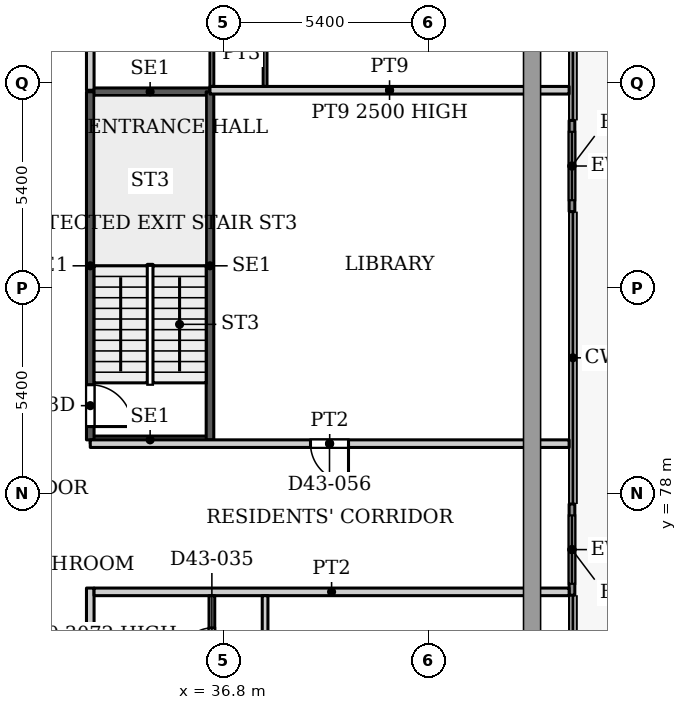
"""IFC4 building model, lengths in metres.
Left out: names, types, materials, properties, quantities, classifications, styles, units other than length and angle.
Written with IfcOpenShell. Run it as: python <this file> out.ifc"""

import sys

from ifc_helpers import new_model, si_unit, direction, frame, frame_2d, origin, place, context, subcontext, project, spatial, rectangle, extrude, source, transform, mapped, element, fill, save


model = new_model("IFC4")
c1 = context("Model", 3, precision=1e-05, world=origin(), true_north=direction((0.0, 1.0)))
c2 = subcontext(c1, "Body", "Model", "MODEL_VIEW")
j1 = project(units=[si_unit("LENGTHUNIT", "METRE"), si_unit("PLANEANGLEUNIT", "RADIAN")], contexts=[c1])
p1 = place(None, origin())
s1 = spatial("IfcSite", under=j1, at=p1, CompositionType="ELEMENT")
p2 = place(p1, origin())
s2 = spatial("IfcBuilding", under=s1, at=p2, CompositionType="ELEMENT")
p3 = place(p2, frame((0.0, 0.0, 187.7)))
s3 = spatial("IfcBuildingStorey", under=s2, at=p3, CompositionType="ELEMENT", Elevation=187.7)
p4 = place(p3, frame((45.975, 87.806, 0.0), z_axis=(0.0, 0.0, 1.0), x_axis=(0.0, -1.0, 0.0)))
e1 = element("IfcWall", 1, at=p4, inside=s3, PredefinedType="SOLIDWALL", context=c2, shape_type="SweptSolid", body=[
    extrude(rectangle(XDim=2.4, YDim=0.15, at=frame_2d((1.2, 0.0))), origin(), (0.0, 0.0, 1.0), 3.75),
])
p5 = place(p4, frame((0.3, 0.0, 0.0)))
e2 = element("IfcOpeningElement", 2, at=p5, cuts=e1, PredefinedType="OPENING", context=c2, shape_type="SweptSolid", body=[
    extrude(rectangle(XDim=1.8, YDim=2.4, at=frame_2d((0.9, 1.2))), frame((0.0, 0.085, 0.0), z_axis=(0.0, -1.0, 0.0), x_axis=(1.0, 0.0, 0.0)), (0.0, 0.0, 1.0), 0.17),
])
p6 = place(p3, frame((45.975, 77.712, 0.0), z_axis=(0.0, 0.0, 1.0), x_axis=(0.0, -1.0, 0.0)))
e3 = element("IfcWall", 3, at=p6, inside=s3, PredefinedType="SOLIDWALL", context=c2, shape_type="SweptSolid", body=[
    extrude(rectangle(XDim=2.4, YDim=0.15, at=frame_2d((1.2, 0.0))), origin(), (0.0, 0.0, 1.0), 3.75),
])
p7 = place(p6, frame((0.3, 0.0, 0.0)))
e4 = element("IfcOpeningElement", 4, at=p7, cuts=e3, PredefinedType="OPENING", context=c2, shape_type="SweptSolid", body=[
    extrude(rectangle(XDim=1.8, YDim=2.4, at=frame_2d((0.9, 1.2))), frame((0.0, 0.085, 0.0), z_axis=(0.0, -1.0, 0.0), x_axis=(1.0, 0.0, 0.0)), (0.0, 0.0, 1.0), 0.17),
])
for number, where, z_axis, x_axis in (
    (5, (33.3, 79.4, 0.0), (0.0, 0.0, 1.0), (1.0, 0.0, 0.0)),
    (6, (33.3, 88.56, 0.0), (0.0, 0.0, 1.0), (1.0, 0.0, 0.0)),
):
    element("IfcWall", number, at=place(p3, frame(where, z_axis=z_axis, x_axis=x_axis)), inside=s3, PredefinedType="SHEAR", context=c2, shape_type="SweptSolid", body=[
        extrude(rectangle(XDim=3.15, YDim=0.2, at=frame_2d((1.575, 0.0))), origin(), (0.0, 0.0, 1.0), 3.9),
    ])
p8 = place(p3, frame((33.3, 79.4, 0.0), z_axis=(0.0, 0.0, 1.0), x_axis=(0.0, 1.0, 0.0)))
e7 = element("IfcWall", 7, at=p8, inside=s3, PredefinedType="SHEAR", context=c2, shape_type="SweptSolid", body=[
    extrude(rectangle(XDim=9.16, YDim=0.2, at=frame_2d((4.58, 0.0))), origin(), (0.0, 0.0, 1.0), 3.9),
])
p9 = place(p8, frame((0.35, 0.0, 0.0)))
e8 = element("IfcOpeningElement", 8, at=p9, cuts=e7, PredefinedType="OPENING", context=c2, shape_type="SweptSolid", body=[
    extrude(rectangle(XDim=1.1, YDim=2.2, at=frame_2d((0.55, 1.1))), frame((0.0, 0.11, 0.0), z_axis=(0.0, -1.0, 0.0), x_axis=(1.0, 0.0, 0.0)), (0.0, 0.0, 1.0), 0.22),
])
p10 = place(p3, frame((36.45, 79.4, 0.0), z_axis=(0.0, 0.0, 1.0), x_axis=(0.0, 1.0, 0.0)))
e9 = element("IfcWall", 9, at=p10, inside=s3, PredefinedType="SHEAR", context=c2, shape_type="SweptSolid", body=[
    extrude(rectangle(XDim=9.16, YDim=0.2, at=frame_2d((4.58, 0.0))), origin(), (0.0, 0.0, 1.0), 3.9),
])
p11 = place(p3, frame((33.3, 57.9, 0.0), z_axis=(0.0, 0.0, 1.0), x_axis=(0.0, 1.0, 0.0)))
e10 = element("IfcWall", 10, at=p11, inside=s3, PredefinedType="PARTITIONING", context=c2, shape_type="SweptSolid", body=[
    extrude(rectangle(XDim=17.6, YDim=0.2, at=frame_2d((8.8, 0.0))), origin(), (0.0, 0.0, 1.0), 3.6),
])
p12 = place(p11, frame((8.9, 0.0, 0.0)))
e11 = element("IfcOpeningElement", 11, at=p12, cuts=e10, PredefinedType="OPENING", context=c2, shape_type="SweptSolid", body=[
    extrude(rectangle(XDim=1.0, YDim=2.1, at=frame_2d((0.5, 1.05))), frame((0.0, 0.11, 0.0), z_axis=(0.0, -1.0, 0.0), x_axis=(1.0, 0.0, 0.0)), (0.0, 0.0, 1.0), 0.22),
])
p13 = place(p3, frame((33.3, 79.3, 0.0), z_axis=(0.0, 0.0, 1.0), x_axis=(1.0, 0.0, 0.0)))
e12 = element("IfcWall", 12, at=p13, inside=s3, PredefinedType="PARTITIONING", context=c2, shape_type="SweptSolid", body=[
    extrude(rectangle(XDim=12.6, YDim=0.2, at=frame_2d((6.3, 0.0))), origin(), (0.0, 0.0, 1.0), 3.6),
])
p14 = place(p13, frame((5.795, 0.0, 0.0)))
e13 = element("IfcOpeningElement", 13, at=p14, cuts=e12, PredefinedType="OPENING", context=c2, shape_type="SweptSolid", body=[
    extrude(rectangle(XDim=1.0, YDim=2.1, at=frame_2d((0.5, 1.05))), frame((0.0, 0.11, 0.0), z_axis=(0.0, -1.0, 0.0), x_axis=(1.0, 0.0, 0.0)), (0.0, 0.0, 1.0), 0.22),
])
p15 = place(p3, frame((33.3, 88.6, 0.0), z_axis=(0.0, 0.0, 1.0), x_axis=(0.0, 1.0, 0.0)))
e14 = element("IfcWall", 14, at=p15, inside=s3, PredefinedType="PARTITIONING", context=c2, shape_type="SweptSolid", body=[
    extrude(rectangle(XDim=5.175, YDim=0.2, at=frame_2d((2.587, 0.0))), origin(), (0.0, 0.0, 1.0), 3.6),
])
p16 = place(p15, frame((3.7, 0.0, 0.0)))
e15 = element("IfcOpeningElement", 15, at=p16, cuts=e14, PredefinedType="OPENING", context=c2, shape_type="SweptSolid", body=[
    extrude(rectangle(XDim=1.0, YDim=2.1, at=frame_2d((0.5, 1.05))), frame((0.0, 0.11, 0.0), z_axis=(0.0, -1.0, 0.0), x_axis=(1.0, 0.0, 0.0)), (0.0, 0.0, 1.0), 0.22),
])
p17 = place(p3, frame((33.4, 75.4, 0.0), z_axis=(0.0, 0.0, 1.0), x_axis=(1.0, 0.0, 0.0)))
e16 = element("IfcWall", 16, at=p17, inside=s3, PredefinedType="PARTITIONING", context=c2, shape_type="SweptSolid", body=[
    extrude(rectangle(XDim=12.5, YDim=0.2, at=frame_2d((6.25, 0.0))), origin(), (0.0, 0.0, 1.0), 3.6),
])
p18 = place(p3, frame((36.45, 88.6, 0.0), z_axis=(0.0, 0.0, 1.0), x_axis=(1.0, 0.0, 0.0)))
e17 = element("IfcWall", 17, at=p18, inside=s3, PredefinedType="PARTITIONING", context=c2, shape_type="SweptSolid", body=[
    extrude(rectangle(XDim=9.45, YDim=0.2, at=frame_2d((4.725, 0.0))), origin(), (0.0, 0.0, 1.0), 2.5),
])
p19 = place(p3, frame((36.5, 68.75, 0.0), z_axis=(0.0, 0.0, 1.0), x_axis=(0.0, 1.0, 0.0)))
e18 = element("IfcWall", 18, at=p19, inside=s3, PredefinedType="PARTITIONING", context=c2, shape_type="SweptSolid", body=[
    extrude(rectangle(XDim=6.55, YDim=0.15, at=frame_2d((3.275, 0.0))), origin(), (0.0, 0.0, 1.0), 3.6),
])
p20 = place(p19, frame((4.9, 0.0, 0.0)))
e19 = element("IfcOpeningElement", 19, at=p20, cuts=e18, PredefinedType="OPENING", context=c2, shape_type="SweptSolid", body=[
    extrude(rectangle(XDim=0.8, YDim=2.1, at=frame_2d((0.4, 1.05))), frame((0.0, 0.085, 0.0), z_axis=(0.0, -1.0, 0.0), x_axis=(1.0, 0.0, 0.0)), (0.0, 0.0, 1.0), 0.17),
])
p21 = place(p19, frame((1.55, 0.0, 0.0)))
e20 = element("IfcOpeningElement", 20, at=p21, cuts=e18, PredefinedType="OPENING", context=c2, shape_type="SweptSolid", body=[
    extrude(rectangle(XDim=0.9, YDim=2.1, at=frame_2d((0.45, 1.05))), frame((0.0, 0.085, 0.0), z_axis=(0.0, -1.0, 0.0), x_axis=(1.0, 0.0, 0.0)), (0.0, 0.0, 1.0), 0.17),
])
p22 = place(p3, frame((36.5, 88.7, 0.0), z_axis=(0.0, 0.0, 1.0), x_axis=(0.0, 1.0, 0.0)))
e21 = element("IfcWall", 21, at=p22, inside=s3, PredefinedType="PARTITIONING", context=c2, shape_type="SweptSolid", body=[
    extrude(rectangle(XDim=3.25, YDim=0.1, at=frame_2d((1.625, 0.0))), origin(), (0.0, 0.0, 1.0), 3.6),
])
p23 = place(p22, frame((1.1, 0.0, 0.0)))
e22 = element("IfcOpeningElement", 22, at=p23, cuts=e21, PredefinedType="OPENING", context=c2, shape_type="SweptSolid", body=[
    extrude(rectangle(XDim=0.9, YDim=2.1, at=frame_2d((0.45, 1.05))), frame((0.0, 0.06, 0.0), z_axis=(0.0, -1.0, 0.0), x_axis=(1.0, 0.0, 0.0)), (0.0, 0.0, 1.0), 0.12),
])
p24 = place(p3, frame((37.9, 58.1, 0.0), z_axis=(0.0, 0.0, 1.0), x_axis=(0.0, 1.0, 0.0)))
e23 = element("IfcWall", 23, at=p24, inside=s3, PredefinedType="PARTITIONING", context=c2, shape_type="SweptSolid", body=[
    extrude(rectangle(XDim=17.2, YDim=0.15, at=frame_2d((8.6, 0.0))), origin(), (0.0, 0.0, 1.0), 3.6),
])
p25 = place(p24, frame((0.95, 0.0, 0.0)))
e24 = element("IfcOpeningElement", 24, at=p25, cuts=e23, PredefinedType="OPENING", context=c2, shape_type="SweptSolid", body=[
    extrude(rectangle(XDim=0.9, YDim=2.1, at=frame_2d((0.45, 1.05))), frame((0.0, 0.085, 0.0), z_axis=(0.0, -1.0, 0.0), x_axis=(1.0, 0.0, 0.0)), (0.0, 0.0, 1.0), 0.17),
])
p26 = place(p24, frame((15.2, 0.0, 0.0)))
e25 = element("IfcOpeningElement", 25, at=p26, cuts=e23, PredefinedType="OPENING", context=c2, shape_type="SweptSolid", body=[
    extrude(rectangle(XDim=0.9, YDim=2.1, at=frame_2d((0.45, 1.05))), frame((0.0, 0.085, 0.0), z_axis=(0.0, -1.0, 0.0), x_axis=(1.0, 0.0, 0.0)), (0.0, 0.0, 1.0), 0.17),
])
p27 = place(p24, frame((9.0, 0.0, 0.0)))
e26 = element("IfcOpeningElement", 26, at=p27, cuts=e23, PredefinedType="OPENING", context=c2, shape_type="SweptSolid", body=[
    extrude(rectangle(XDim=1.0, YDim=2.1, at=frame_2d((0.5, 1.05))), frame((0.0, 0.085, 0.0), z_axis=(0.0, -1.0, 0.0), x_axis=(1.0, 0.0, 0.0)), (0.0, 0.0, 1.0), 0.17),
])
p28 = place(p24, frame((12.2, 0.0, 0.0)))
e27 = element("IfcOpeningElement", 27, at=p28, cuts=e23, PredefinedType="OPENING", context=c2, shape_type="SweptSolid", body=[
    extrude(rectangle(XDim=0.9, YDim=2.1, at=frame_2d((0.45, 1.05))), frame((0.0, 0.085, 0.0), z_axis=(0.0, -1.0, 0.0), x_axis=(1.0, 0.0, 0.0)), (0.0, 0.0, 1.0), 0.17),
])
p29 = place(p24, frame((3.8, 0.0, 0.0)))
e28 = element("IfcOpeningElement", 28, at=p29, cuts=e23, PredefinedType="OPENING", context=c2, shape_type="SweptSolid", body=[
    extrude(rectangle(XDim=0.9, YDim=2.1, at=frame_2d((0.45, 1.05))), frame((0.0, 0.085, 0.0), z_axis=(0.0, -1.0, 0.0), x_axis=(1.0, 0.0, 0.0)), (0.0, 0.0, 1.0), 0.17),
])
p30 = place(p3, frame((37.9, 88.7, 0.0), z_axis=(0.0, 0.0, 1.0), x_axis=(0.0, 1.0, 0.0)))
e29 = element("IfcWall", 29, at=p30, inside=s3, PredefinedType="PARTITIONING", context=c2, shape_type="SweptSolid", body=[
    extrude(rectangle(XDim=9.2, YDim=0.1, at=frame_2d((4.6, 0.0))), origin(), (0.0, 0.0, 1.0), 3.6),
])
p31 = place(p30, frame((1.4, 0.0, 0.0)))
e30 = element("IfcOpeningElement", 30, at=p31, cuts=e29, PredefinedType="OPENING", context=c2, shape_type="SweptSolid", body=[
    extrude(rectangle(XDim=0.9, YDim=2.1, at=frame_2d((0.45, 1.05))), frame((0.0, 0.06, 0.0), z_axis=(0.0, -1.0, 0.0), x_axis=(1.0, 0.0, 0.0)), (0.0, 0.0, 1.0), 0.12),
])
p32 = place(p30, frame((6.0, 0.0, 0.0)))
e31 = element("IfcOpeningElement", 31, at=p32, cuts=e29, PredefinedType="OPENING", context=c2, shape_type="SweptSolid", body=[
    extrude(rectangle(XDim=1.0, YDim=2.1, at=frame_2d((0.5, 1.05))), frame((0.0, 0.06, 0.0), z_axis=(0.0, -1.0, 0.0), x_axis=(1.0, 0.0, 0.0)), (0.0, 0.0, 1.0), 0.12),
])
m1 = source(origin(), c2, "Body", "SweptSolid", [
    extrude(rectangle(XDim=1.8, YDim=2.4, at=frame_2d((0.9, 1.2))), frame((0.0, 0.025, 0.0), z_axis=(0.0, -1.0, 0.0), x_axis=(1.0, 0.0, 0.0)), (0.0, 0.0, 1.0), 0.05),
])
p33 = place(p5, origin())
e32 = element("IfcDoor", 32, at=p33, inside=s3, OperationType="SLIDING_TO_LEFT", PredefinedType="DOOR", context=c2, shape_type="MappedRepresentation", body=[
    mapped(m1, transform((0.0, 0.0, 0.0), x_axis=(1.0, 0.0, 0.0), y_axis=(0.0, 1.0, 0.0), z_axis=(0.0, 0.0, 1.0), scale=1.0)),
])
fill(e2, e32)
p34 = place(p7, origin())
e33 = element("IfcDoor", 33, at=p34, inside=s3, OperationType="SLIDING_TO_LEFT", PredefinedType="DOOR", context=c2, shape_type="MappedRepresentation", body=[
    mapped(m1, transform((0.0, 0.0, 0.0), x_axis=(1.0, 0.0, 0.0), y_axis=(0.0, 1.0, 0.0), z_axis=(0.0, 0.0, 1.0), scale=1.0)),
])
fill(e4, e33)
m2 = source(origin(), c2, "Body", "SweptSolid", [
    extrude(rectangle(XDim=1.1, YDim=2.2, at=frame_2d((0.55, 1.1))), frame((0.0, 0.025, 0.0), z_axis=(0.0, -1.0, 0.0), x_axis=(1.0, 0.0, 0.0)), (0.0, 0.0, 1.0), 0.05),
])
p35 = place(p9, origin())
e34 = element("IfcDoor", 34, at=p35, inside=s3, OperationType="SINGLE_SWING_RIGHT", PredefinedType="DOOR", context=c2, shape_type="MappedRepresentation", body=[
    mapped(m2, transform((0.0, 0.0, 0.0), x_axis=(1.0, 0.0, 0.0), y_axis=(0.0, 1.0, 0.0), z_axis=(0.0, 0.0, 1.0), scale=1.0)),
])
fill(e8, e34)
m3 = source(origin(), c2, "Body", "SweptSolid", [
    extrude(rectangle(XDim=0.8, YDim=2.1, at=frame_2d((0.4, 1.05))), frame((0.0, 0.025, 0.0), z_axis=(0.0, -1.0, 0.0), x_axis=(1.0, 0.0, 0.0)), (0.0, 0.0, 1.0), 0.05),
])
p36 = place(p20, origin())
e35 = element("IfcDoor", 35, at=p36, inside=s3, OperationType="SINGLE_SWING_LEFT", PredefinedType="DOOR", context=c2, shape_type="MappedRepresentation", body=[
    mapped(m3, transform((0.0, 0.0, 0.0), x_axis=(1.0, 0.0, 0.0), y_axis=(0.0, 1.0, 0.0), z_axis=(0.0, 0.0, 1.0), scale=1.0)),
])
fill(e19, e35)
m4 = source(origin(), c2, "Body", "SweptSolid", [
    extrude(rectangle(XDim=1.0, YDim=2.1, at=frame_2d((0.5, 1.05))), frame((0.0, 0.025, 0.0), z_axis=(0.0, -1.0, 0.0), x_axis=(1.0, 0.0, 0.0)), (0.0, 0.0, 1.0), 0.05),
])
p37 = place(p14, origin())
e36 = element("IfcDoor", 36, at=p37, inside=s3, OperationType="SINGLE_SWING_RIGHT", PredefinedType="DOOR", context=c2, shape_type="MappedRepresentation", body=[
    mapped(m4, transform((0.0, 0.0, 0.0), x_axis=(1.0, 0.0, 0.0), y_axis=(0.0, 1.0, 0.0), z_axis=(0.0, 0.0, 1.0), scale=1.0)),
])
fill(e13, e36)
save(model, sys.argv[1])
